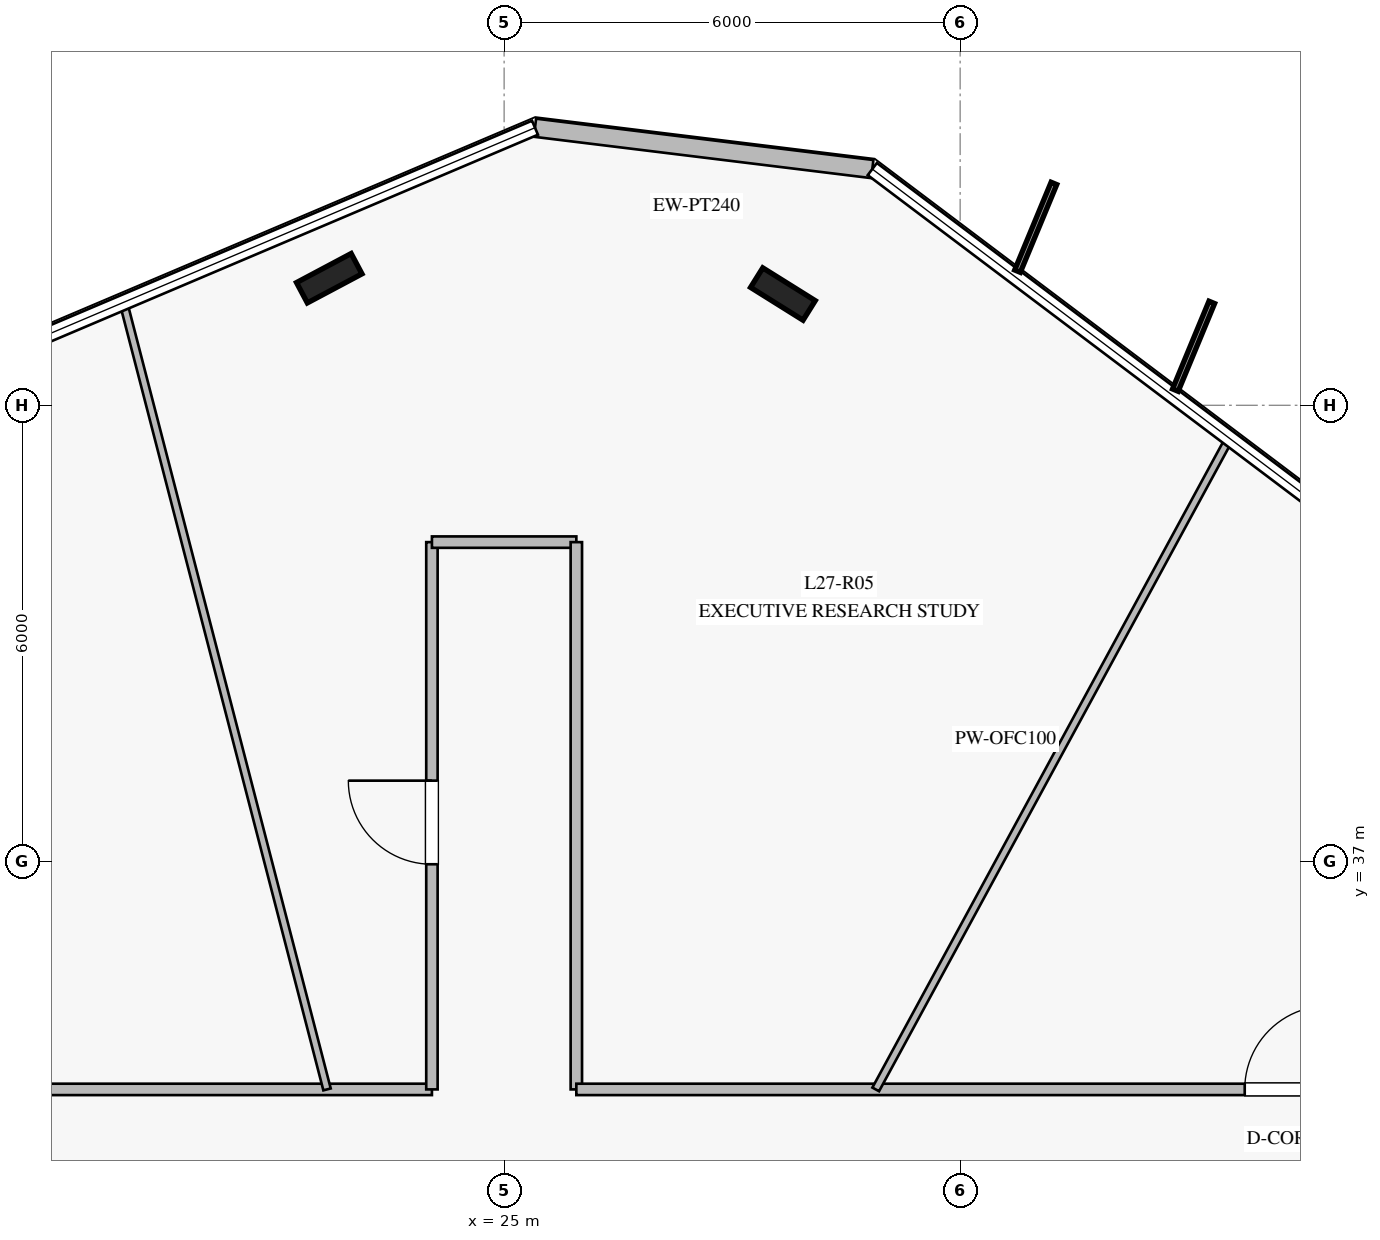
"""IFC4 building model, lengths in metres.
Left out: names, types, materials, properties, quantities, classifications, styles, units other than length and angle.
Written with IfcOpenShell. Run it as: python <this file> out.ifc"""

import sys

from ifc_helpers import new_model, si_unit, direction, frame, frame_2d, origin, origin_2d, place, context, subcontext, project, spatial, rectangle, i_section, extrude, element, fill, save


model = new_model("IFC4")
c1 = context("Model", 3, precision=1e-05, world=origin(), true_north=direction((0.0, 1.0)))
c2 = subcontext(c1, "Body", "Model", "MODEL_VIEW")
j1 = project(units=[si_unit("LENGTHUNIT", "METRE"), si_unit("PLANEANGLEUNIT", "RADIAN")], contexts=[c1])
p1 = place(None, origin())
s1 = spatial("IfcSite", under=j1, at=p1, CompositionType="ELEMENT")
p2 = place(p1, origin())
s2 = spatial("IfcBuilding", under=s1, at=p2, CompositionType="ELEMENT")
p3 = place(p2, frame((0.0, 0.0, 114.4)))
s3 = spatial("IfcBuildingStorey", under=s2, at=p3, CompositionType="ELEMENT", Elevation=114.4)
for number, where, z_axis, x_axis in (
    (1, (28.668, 44.464, 0.0), (0.0, 0.0, 1.0), (-0.848, 0.53, 0.0)),
    (2, (22.699, 44.672, 0.0), (0.0, 0.0, 1.0), (0.883, 0.469, 0.0)),
):
    element("IfcColumn", number, at=place(p3, frame(where, z_axis=z_axis, x_axis=x_axis)), inside=s3, PredefinedType="COLUMN", context=c2, shape_type="SweptSolid", body=[
        extrude(i_section(OverallWidth=0.303, OverallDepth=0.814, WebThickness=0.021, FlangeThickness=0.04, at=origin_2d()), origin(), (0.0, 0.0, 1.0), 4.0),
    ])
p4 = place(p3, frame((29.844, 46.108, 0.0), z_axis=(0.0, 0.0, 1.0), x_axis=(-0.992565806089, 0.121709163922, 0.0)))
e3 = element("IfcWall", 3, at=p4, inside=s3, PredefinedType="STANDARD", context=c2, shape_type="SweptSolid", body=[
    extrude(rectangle(XDim=4.471, YDim=0.24, at=frame_2d((2.236, 0.0))), origin(), (0.0, 0.0, 1.0), 3.76),
])
p5 = place(p3, frame((17.2, 34.0, 0.0), z_axis=(0.0, 0.0, 1.0), x_axis=(1.0, 0.0, 0.0)))
e4 = element("IfcWall", 4, at=p5, inside=s3, PredefinedType="PARTITIONING", context=c2, shape_type="SweptSolid", body=[
    extrude(rectangle(XDim=6.85, YDim=0.15, at=frame_2d((3.425, 0.0))), origin(), (0.0, 0.0, 1.0), 3.21),
])
p6 = place(p3, frame((24.05, 34.0, 0.0), z_axis=(0.0, 0.0, 1.0), x_axis=(0.0, 1.0, 0.0)))
e5 = element("IfcWall", 5, at=p6, inside=s3, PredefinedType="PARTITIONING", context=c2, shape_type="SweptSolid", body=[
    extrude(rectangle(XDim=7.2, YDim=0.15, at=frame_2d((3.6, 0.0))), origin(), (0.0, 0.0, 1.0), 3.36),
])
p7 = place(p6, frame((2.962, 0.0, 0.0)))
e6 = element("IfcOpeningElement", 6, at=p7, cuts=e5, PredefinedType="OPENING", context=c2, shape_type="SweptSolid", body=[
    extrude(rectangle(XDim=1.1, YDim=2.2, at=frame_2d((0.55, 1.1))), frame((0.0, 0.085, 0.0), z_axis=(0.0, -1.0, 0.0), x_axis=(1.0, 0.0, 0.0)), (0.0, 0.0, 1.0), 0.17),
])
p8 = place(p3, frame((24.05, 41.2, 0.0), z_axis=(0.0, 0.0, 1.0), x_axis=(1.0, 0.0, 0.0)))
e7 = element("IfcWall", 7, at=p8, inside=s3, PredefinedType="PARTITIONING", context=c2, shape_type="SweptSolid", body=[
    extrude(rectangle(XDim=1.9, YDim=0.15, at=frame_2d((0.95, 0.0))), origin(), (0.0, 0.0, 1.0), 3.76),
])
p9 = place(p3, frame((25.95, 41.2, 0.0), z_axis=(0.0, 0.0, 1.0), x_axis=(0.0, -1.0, 0.0)))
e8 = element("IfcWall", 8, at=p9, inside=s3, PredefinedType="PARTITIONING", context=c2, shape_type="SweptSolid", body=[
    extrude(rectangle(XDim=7.2, YDim=0.15, at=frame_2d((3.6, 0.0))), origin(), (0.0, 0.0, 1.0), 3.36),
])
p10 = place(p3, frame((25.95, 34.0, 0.0), z_axis=(0.0, 0.0, 1.0), x_axis=(1.0, 0.0, 0.0)))
e9 = element("IfcWall", 9, at=p10, inside=s3, PredefinedType="PARTITIONING", context=c2, shape_type="SweptSolid", body=[
    extrude(rectangle(XDim=15.25, YDim=0.15, at=frame_2d((7.625, 0.0))), origin(), (0.0, 0.0, 1.0), 3.21),
])
p11 = place(p10, frame((8.794, 0.0, 0.0)))
e10 = element("IfcOpeningElement", 10, at=p11, cuts=e9, PredefinedType="OPENING", context=c2, shape_type="SweptSolid", body=[
    extrude(rectangle(XDim=1.1, YDim=2.2, at=frame_2d((0.55, 1.1))), frame((0.0, 0.085, 0.0), z_axis=(0.0, -1.0, 0.0), x_axis=(1.0, 0.0, 0.0)), (0.0, 0.0, 1.0), 0.17),
])
p12 = place(p3, frame((29.889, 34.0, 0.0), z_axis=(0.0, 0.0, 1.0), x_axis=(0.477332684536, 0.878722657199, 0.0)))
e11 = element("IfcWall", 11, at=p12, inside=s3, PredefinedType="MOVABLE", context=c2, shape_type="SweptSolid", body=[
    extrude(rectangle(XDim=9.731, YDim=0.1, at=frame_2d((4.866, 0.0))), origin(), (0.0, 0.0, 1.0), 3.16),
])
p13 = place(p3, frame((22.67, 34.0, 0.0), z_axis=(0.0, 0.0, 1.0), x_axis=(-0.250533593691, 0.968107906399, 0.0)))
e12 = element("IfcWall", 12, at=p13, inside=s3, PredefinedType="MOVABLE", context=c2, shape_type="SweptSolid", body=[
    extrude(rectangle(XDim=10.677, YDim=0.1, at=frame_2d((5.338, 0.0))), origin(), (0.0, 0.0, 1.0), 3.16),
])
p14 = place(p11, origin())
e13 = element("IfcDoor", 13, at=p14, inside=s3, OperationType="SINGLE_SWING_RIGHT", PredefinedType="DOOR", context=c2, shape_type="SweptSolid", body=[
    extrude(rectangle(XDim=1.1, YDim=2.2, at=frame_2d((0.55, 1.1))), frame((0.0, 0.025, 0.0), z_axis=(0.0, -1.0, 0.0), x_axis=(1.0, 0.0, 0.0)), (0.0, 0.0, 1.0), 0.05),
])
fill(e10, e13)
p15 = place(p7, origin())
e14 = element("IfcDoor", 14, at=p15, inside=s3, OperationType="SINGLE_SWING_RIGHT", PredefinedType="DOOR", context=c2, shape_type="SweptSolid", body=[
    extrude(rectangle(XDim=1.1, YDim=2.2, at=frame_2d((0.55, 1.1))), frame((0.0, 0.025, 0.0), z_axis=(0.0, -1.0, 0.0), x_axis=(1.0, 0.0, 0.0)), (0.0, 0.0, 1.0), 0.05),
])
fill(e6, e14)
save(model, sys.argv[1])
